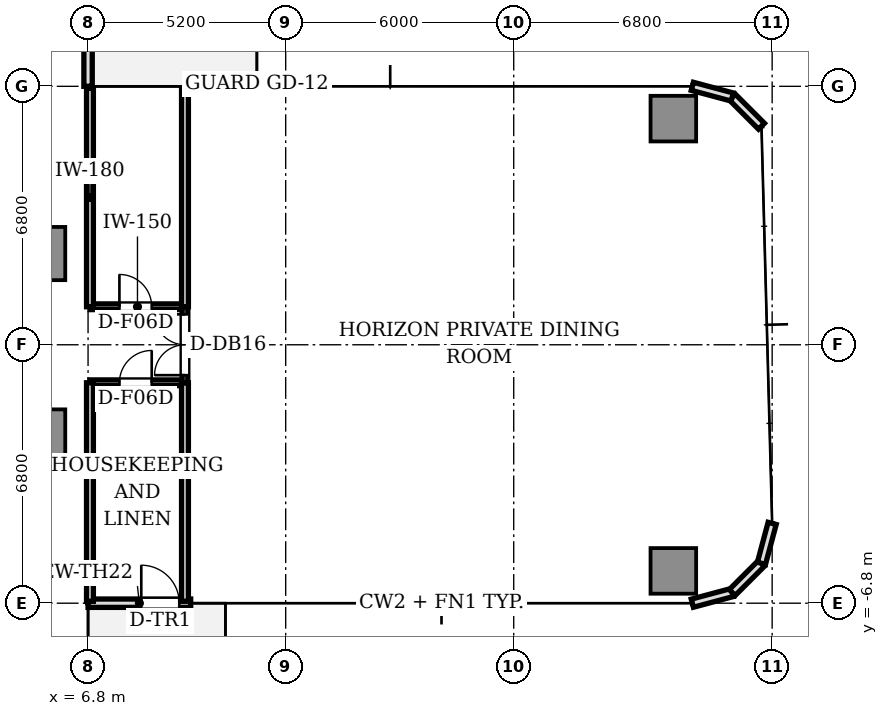
"""IFC4 building model, lengths in metres.
Left out: names, types, materials, properties, quantities, classifications, styles, units other than length and angle.
Written with IfcOpenShell. Run it as: python <this file> out.ifc"""

import sys

from ifc_helpers import new_model, si_unit, direction, frame, frame_2d, origin, origin_2d, place, context, subcontext, project, spatial, rectangle, extrude, source, transform, mapped, element, fill, save


model = new_model("IFC4")
c1 = context("Model", 3, precision=1e-05, world=origin(), true_north=direction((0.0, 1.0)))
c2 = subcontext(c1, "Body", "Model", "MODEL_VIEW")
j1 = project(units=[si_unit("LENGTHUNIT", "METRE"), si_unit("PLANEANGLEUNIT", "RADIAN")], contexts=[c1])
p1 = place(None, origin())
s1 = spatial("IfcSite", under=j1, at=p1, CompositionType="ELEMENT")
p2 = place(p1, origin())
s2 = spatial("IfcBuilding", under=s1, at=p2, CompositionType="ELEMENT")
p3 = place(p2, frame((0.0, 0.0, 67.8)))
s3 = spatial("IfcBuildingStorey", under=s2, at=p3, CompositionType="ELEMENT", Elevation=67.8)
m1 = source(origin(), c2, "Body", "SweptSolid", [
    extrude(rectangle(XDim=1.4, YDim=1.4, at=origin_2d()), origin(), (0.0, 0.0, 1.0), 3.11),
])
for number, where, z_axis, x_axis in (
    (1, (5.5, 2.4, 0.0), (0.0, 0.0, 1.0), (1.0, 0.0, 0.0)),
    (2, (5.5, -2.4, 0.0), (0.0, 0.0, 1.0), (1.0, 0.0, 0.0)),
):
    element("IfcColumn", number, at=place(p3, frame(where, z_axis=z_axis, x_axis=x_axis)), inside=s3, PredefinedType="COLUMN", context=c2, shape_type="MappedRepresentation", body=[
        mapped(m1, transform((0.0, 0.0, 0.0), scale=1.0)),
    ])
m2 = source(origin(), c2, "Body", "SweptSolid", [
    extrude(rectangle(XDim=1.2, YDim=1.2, at=origin_2d()), origin(), (0.0, 0.0, 1.0), 3.11),
])
for number, where, z_axis, x_axis in (
    (3, (22.2, -5.95, 0.0), (0.0, 0.0, 1.0), (1.0, 0.0, 0.0)),
    (4, (22.2, 5.95, 0.0), (0.0, 0.0, 1.0), (1.0, 0.0, 0.0)),
):
    element("IfcColumn", number, at=place(p3, frame(where, z_axis=z_axis, x_axis=x_axis)), inside=s3, PredefinedType="COLUMN", context=c2, shape_type="MappedRepresentation", body=[
        mapped(m2, transform((0.0, 0.0, 0.0), scale=1.0)),
    ])
p4 = place(p3, frame((6.8, -6.8, 0.0), z_axis=(0.0, 0.0, 1.0), x_axis=(1.0, 0.0, 0.0)))
e5 = element("IfcWall", 5, at=p4, inside=s3, PredefinedType="STANDARD", context=c2, shape_type="SweptSolid", body=[
    extrude(rectangle(XDim=2.7, YDim=0.22, at=frame_2d((1.35, 0.0))), origin(), (0.0, 0.0, 1.0), 3.11),
])
p5 = place(p4, frame((1.4, 0.0, 0.0)))
e6 = element("IfcOpeningElement", 6, at=p5, cuts=e5, PredefinedType="OPENING", context=c2, shape_type="SweptSolid", body=[
    extrude(rectangle(XDim=1.0, YDim=2.2, at=frame_2d((0.5, 1.1))), frame((0.0, 0.12, 0.0), z_axis=(0.0, -1.0, 0.0), x_axis=(1.0, 0.0, 0.0)), (0.0, 0.0, 1.0), 0.24),
])
for number, where, z_axis, x_axis in (
    (7, (22.7, -6.8, 0.0), (0.0, 0.0, 1.0), (0.966, 0.259, 0.0)),
    (8, (23.75, -6.519, 0.0), (0.0, 0.0, 1.0), (0.707, 0.707, 0.0)),
    (9, (24.519, -5.75, 0.0), (0.0, 0.0, 1.0), (0.259, 0.966, 0.0)),
    (10, (24.519, 5.75, 0.0), (0.0, 0.0, 1.0), (-0.707, 0.707, 0.0)),
    (11, (23.75, 6.519, 0.0), (0.0, 0.0, 1.0), (-0.966, 0.259, 0.0)),
):
    element("IfcWall", number, at=place(p3, frame(where, z_axis=z_axis, x_axis=x_axis)), inside=s3, PredefinedType="STANDARD", context=c2, shape_type="SweptSolid", body=[
        extrude(rectangle(XDim=1.087, YDim=0.22, at=frame_2d((0.543, 0.0))), origin(), (0.0, 0.0, 1.0), 3.11),
    ])
p6 = place(p3, frame((6.8, 6.8, 0.0), z_axis=(0.0, 0.0, 1.0), x_axis=(0.0, 1.0, 0.0)))
e12 = element("IfcWall", 12, at=p6, inside=s3, PredefinedType="STANDARD", context=c2, shape_type="SweptSolid", body=[
    extrude(rectangle(XDim=2.7, YDim=0.22, at=frame_2d((1.35, 0.0))), origin(), (0.0, 0.0, 1.0), 3.11),
])
p7 = place(p6, frame((1.4, 0.0, 0.0)))
e13 = element("IfcOpeningElement", 13, at=p7, cuts=e12, PredefinedType="OPENING", context=c2, shape_type="SweptSolid", body=[
    extrude(rectangle(XDim=1.0, YDim=2.2, at=frame_2d((0.5, 1.1))), frame((0.0, 0.12, 0.0), z_axis=(0.0, -1.0, 0.0), x_axis=(1.0, 0.0, 0.0)), (0.0, 0.0, 1.0), 0.24),
])
p8 = place(p3, frame((6.85, 1.0, 0.0), z_axis=(0.0, 0.0, 1.0), x_axis=(1.0, 0.0, 0.0)))
e14 = element("IfcWall", 14, at=p8, inside=s3, PredefinedType="PARTITIONING", context=c2, shape_type="SweptSolid", body=[
    extrude(rectangle(XDim=2.5, YDim=0.15, at=frame_2d((1.25, 0.0))), origin(), (0.0, 0.0, 1.0), 2.66),
])
p9 = place(p8, frame((0.775, 0.0, 0.0)))
e15 = element("IfcOpeningElement", 15, at=p9, cuts=e14, PredefinedType="OPENING", context=c2, shape_type="SweptSolid", body=[
    extrude(rectangle(XDim=0.85, YDim=2.1, at=frame_2d((0.425, 1.05))), frame((0.0, 0.085, 0.0), z_axis=(0.0, -1.0, 0.0), x_axis=(1.0, 0.0, 0.0)), (0.0, 0.0, 1.0), 0.17),
])
p10 = place(p3, frame((6.85, -1.0, 0.0), z_axis=(0.0, 0.0, 1.0), x_axis=(1.0, 0.0, 0.0)))
e16 = element("IfcWall", 16, at=p10, inside=s3, PredefinedType="PARTITIONING", context=c2, shape_type="SweptSolid", body=[
    extrude(rectangle(XDim=2.5, YDim=0.15, at=frame_2d((1.25, 0.0))), origin(), (0.0, 0.0, 1.0), 2.66),
])
p11 = place(p10, frame((0.775, 0.0, 0.0)))
e17 = element("IfcOpeningElement", 17, at=p11, cuts=e16, PredefinedType="OPENING", context=c2, shape_type="SweptSolid", body=[
    extrude(rectangle(XDim=0.85, YDim=2.1, at=frame_2d((0.425, 1.05))), frame((0.0, 0.085, 0.0), z_axis=(0.0, -1.0, 0.0), x_axis=(1.0, 0.0, 0.0)), (0.0, 0.0, 1.0), 0.17),
])
for number, where, z_axis, x_axis in (
    (18, (6.85, 1.0, 0.0), (0.0, 0.0, 1.0), (0.0, 1.0, 0.0)),
    (19, (6.85, -6.75, 0.0), (0.0, 0.0, 1.0), (0.0, 1.0, 0.0)),
    (20, (9.35, -1.0, 0.0), (0.0, 0.0, 1.0), (0.0, -1.0, 0.0)),
    (21, (9.35, 1.0, 0.0), (0.0, 0.0, 1.0), (0.0, 1.0, 0.0)),
):
    element("IfcWall", number, at=place(p3, frame(where, z_axis=z_axis, x_axis=x_axis)), inside=s3, PredefinedType="PARTITIONING", context=c2, shape_type="SweptSolid", body=[
        extrude(rectangle(XDim=5.75, YDim=0.18, at=frame_2d((2.875, 0.0))), origin(), (0.0, 0.0, 1.0), 2.66),
    ])
p12 = place(p3, frame((9.35, -1.0, 0.0), z_axis=(0.0, 0.0, 1.0), x_axis=(0.0, 1.0, 0.0)))
e22 = element("IfcWall", 22, at=p12, inside=s3, PredefinedType="PARTITIONING", context=c2, shape_type="SweptSolid", body=[
    extrude(rectangle(XDim=2.0, YDim=0.15, at=frame_2d((1.0, 0.0))), origin(), (0.0, 0.0, 1.0), 2.66),
])
p13 = place(p12, frame((0.2, 0.0, 0.0)))
e23 = element("IfcOpeningElement", 23, at=p13, cuts=e22, PredefinedType="OPENING", context=c2, shape_type="SweptSolid", body=[
    extrude(rectangle(XDim=1.6, YDim=2.25, at=frame_2d((0.8, 1.125))), frame((0.0, 0.085, 0.0), z_axis=(0.0, -1.0, 0.0), x_axis=(1.0, 0.0, 0.0)), (0.0, 0.0, 1.0), 0.17),
])
m3 = source(origin(), c2, "Body", "SweptSolid", [
    extrude(rectangle(XDim=1.0, YDim=0.05, at=origin_2d()), origin(), (0.0, 0.0, 1.0), 2.2),
])
p14 = place(p5, frame((0.5, 0.0, 0.0)))
e24 = element("IfcDoor", 24, at=p14, inside=s3, OperationType="SINGLE_SWING_LEFT", PredefinedType="DOOR", context=c2, shape_type="MappedRepresentation", body=[
    mapped(m3, transform((0.0, 0.0, 0.0), scale=1.0)),
])
fill(e6, e24)
m4 = source(origin(), c2, "Body", "SweptSolid", [
    extrude(rectangle(XDim=0.85, YDim=0.05, at=origin_2d()), origin(), (0.0, 0.0, 1.0), 2.1),
])
p15 = place(p11, frame((0.425, 0.0, 0.0)))
e25 = element("IfcDoor", 25, at=p15, inside=s3, OperationType="SINGLE_SWING_RIGHT", PredefinedType="DOOR", context=c2, shape_type="MappedRepresentation", body=[
    mapped(m4, transform((0.0, 0.0, 0.0), scale=1.0)),
])
fill(e17, e25)
p16 = place(p9, frame((0.425, 0.0, 0.0)))
e26 = element("IfcDoor", 26, at=p16, inside=s3, OperationType="SINGLE_SWING_LEFT", PredefinedType="DOOR", context=c2, shape_type="MappedRepresentation", body=[
    mapped(m4, transform((0.0, 0.0, 0.0), scale=1.0)),
])
fill(e15, e26)
m5 = source(origin(), c2, "Body", "SweptSolid", [
    extrude(rectangle(XDim=1.6, YDim=0.05, at=origin_2d()), origin(), (0.0, 0.0, 1.0), 2.25),
])
p17 = place(p13, frame((0.8, 0.0, 0.0)))
e27 = element("IfcDoor", 27, at=p17, inside=s3, OperationType="DOUBLE_DOOR_SINGLE_SWING", PredefinedType="DOOR", context=c2, shape_type="MappedRepresentation", body=[
    mapped(m5, transform((0.0, 0.0, 0.0), scale=1.0)),
])
fill(e23, e27)
save(model, sys.argv[1])
